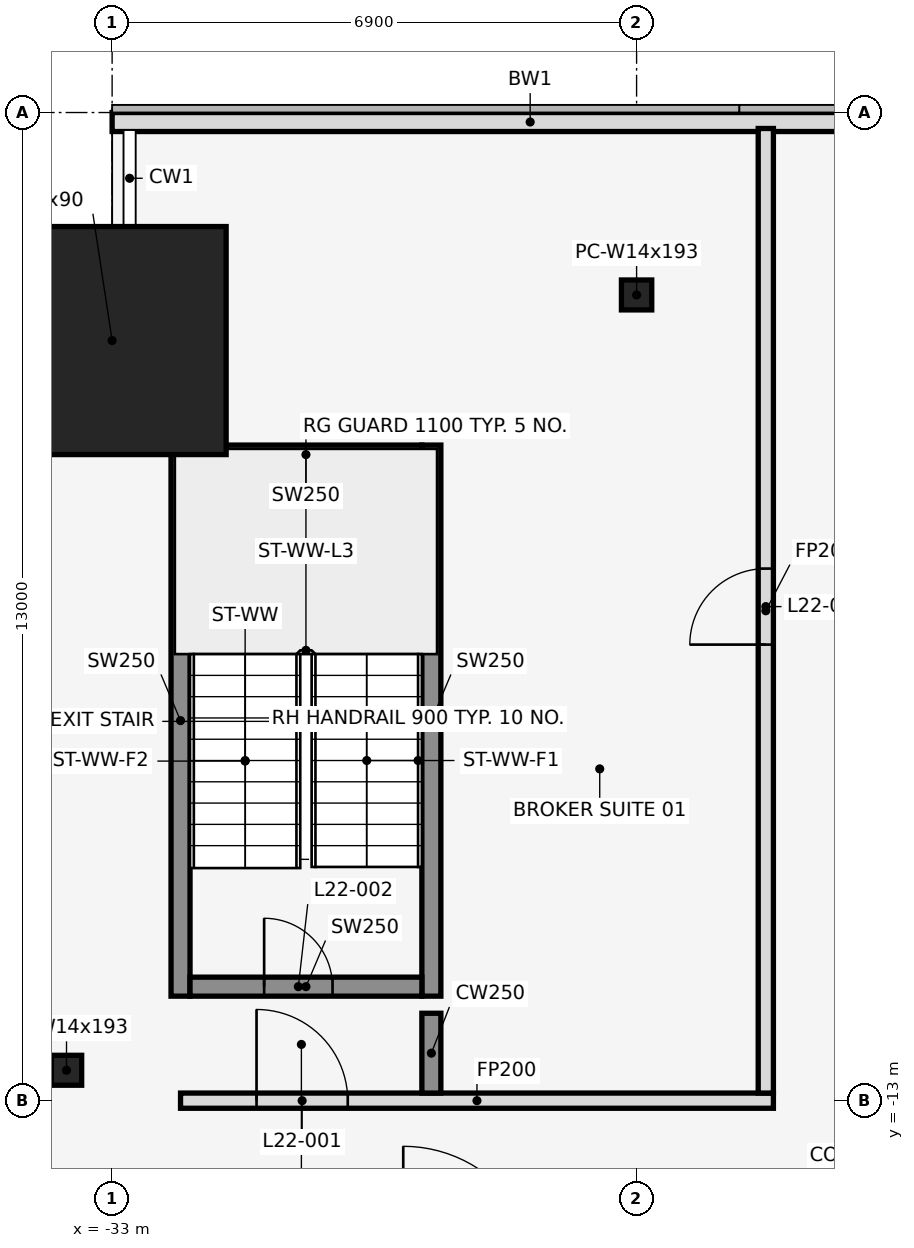
"""IFC4 building model, lengths in metres.
Left out: names, types, materials, properties, quantities, classifications, styles, units other than length and angle.
Written with IfcOpenShell. Run it as: python <this file> out.ifc"""

import sys

from ifc_helpers import new_model, si_unit, direction, frame, frame_2d, origin, origin_2d, place, context, subcontext, project, spatial, rectangle, hollow_rectangle, i_section, extrude, element, fill, save


model = new_model("IFC4")
c1 = context("Model", 3, precision=1e-05, world=origin(), true_north=direction((0.0, 1.0)))
c2 = subcontext(c1, "Body", "Model", "MODEL_VIEW")
j1 = project(units=[si_unit("LENGTHUNIT", "METRE"), si_unit("PLANEANGLEUNIT", "RADIAN")], contexts=[c1])
p1 = place(None, origin())
s1 = spatial("IfcSite", under=j1, at=p1, CompositionType="ELEMENT")
p2 = place(p1, origin())
s2 = spatial("IfcBuilding", under=s1, at=p2, CompositionType="ELEMENT")
p3 = place(p2, frame((0.0, 0.0, 106.3)))
s3 = spatial("IfcBuildingStorey", under=s2, at=p3, CompositionType="ELEMENT", Elevation=106.3)
p4 = place(p3, frame((-33.0, -3.0, 0.0), z_axis=(0.0, 0.0, 1.0), x_axis=(1.0, 0.0, 0.0)))
e1 = element("IfcColumn", 1, at=p4, inside=s3, PredefinedType="COLUMN", context=c2, shape_type="SweptSolid", body=[
    extrude(hollow_rectangle(XDim=3.0, YDim=3.0, WallThickness=0.09, at=origin_2d()), origin(), (0.0, 0.0, 1.0), 4.1),
])
for number, where, z_axis, x_axis in (
    (2, (-26.1, -2.4, 0.0), (0.0, 0.0, 1.0), (1.0, 0.0, 0.0)),
    (3, (-33.6, -12.6, 0.0), (0.0, 0.0, 1.0), (1.0, 0.0, 0.0)),
):
    element("IfcColumn", number, at=place(p3, frame(where, z_axis=z_axis, x_axis=x_axis)), inside=s3, PredefinedType="COLUMN", context=c2, shape_type="SweptSolid", body=[
        extrude(i_section(OverallWidth=0.399, OverallDepth=0.394, WebThickness=0.023, FlangeThickness=0.037, at=origin_2d()), origin(), (0.0, 0.0, 1.0), 4.1),
    ])
p5 = place(p3, frame((-22.0, -0.125, 0.0), z_axis=(0.0, 0.0, 1.0), x_axis=(-1.0, 0.0, 0.0)))
e4 = element("IfcWall", 4, at=p5, inside=s3, PredefinedType="STANDARD", context=c2, shape_type="SweptSolid", body=[
    extrude(rectangle(XDim=11.0, YDim=0.25, at=frame_2d((5.5, 0.0))), origin(), (0.0, 0.0, 1.0), 3.95),
])
for number, where, z_axis, x_axis in (
    (5, (-32.1, -11.625, 0.0), (0.0, 0.0, 1.0), (0.0, 1.0, 0.0)),
    (6, (-28.8, -11.625, 0.0), (0.0, 0.0, 1.0), (0.0, 1.0, 0.0)),
):
    element("IfcWall", number, at=place(p3, frame(where, z_axis=z_axis, x_axis=x_axis)), inside=s3, PredefinedType="SHEAR", context=c2, shape_type="SweptSolid", body=[
        extrude(rectangle(XDim=7.25, YDim=0.25, at=frame_2d((3.625, 0.0))), origin(), (0.0, 0.0, 1.0), 4.1),
    ])
p6 = place(p3, frame((-31.975, -11.5, 0.0), z_axis=(0.0, 0.0, 1.0), x_axis=(1.0, 0.0, 0.0)))
e7 = element("IfcWall", 7, at=p6, inside=s3, PredefinedType="SHEAR", context=c2, shape_type="SweptSolid", body=[
    extrude(rectangle(XDim=3.05, YDim=0.25, at=frame_2d((1.525, 0.0))), origin(), (0.0, 0.0, 1.0), 4.1),
])
p7 = place(p6, frame((0.975, 0.0, 0.0)))
e8 = element("IfcOpeningElement", 8, at=p7, cuts=e7, PredefinedType="OPENING", context=c2, shape_type="SweptSolid", body=[
    extrude(rectangle(XDim=0.9, YDim=2.1, at=frame_2d((0.45, 1.05))), frame((0.0, 0.137, 0.0), z_axis=(0.0, -1.0, 0.0), x_axis=(1.0, 0.0, 0.0)), (0.0, 0.0, 1.0), 0.274),
])
p8 = place(p3, frame((-31.975, -4.5, 0.0), z_axis=(0.0, 0.0, 1.0), x_axis=(1.0, 0.0, 0.0)))
e9 = element("IfcWall", 9, at=p8, inside=s3, PredefinedType="SHEAR", context=c2, shape_type="SweptSolid", body=[
    extrude(rectangle(XDim=3.05, YDim=0.25, at=frame_2d((1.525, 0.0))), origin(), (0.0, 0.0, 1.0), 4.1),
])
p9 = place(p3, frame((-32.1, -13.0, 0.0), z_axis=(0.0, 0.0, 1.0), x_axis=(1.0, 0.0, 0.0)))
e10 = element("IfcWall", 10, at=p9, inside=s3, PredefinedType="PARTITIONING", context=c2, shape_type="SweptSolid", body=[
    extrude(rectangle(XDim=7.8, YDim=0.2, at=frame_2d((3.9, 0.0))), origin(), (0.0, 0.0, 1.0), 3.018),
])
p10 = place(p9, frame((1.0, 0.0, 0.0)))
e11 = element("IfcOpeningElement", 11, at=p10, cuts=e10, PredefinedType="OPENING", context=c2, shape_type="SweptSolid", body=[
    extrude(rectangle(XDim=1.2, YDim=2.1, at=frame_2d((0.6, 1.05))), frame((0.0, 0.112, 0.0), z_axis=(0.0, -1.0, 0.0), x_axis=(1.0, 0.0, 0.0)), (0.0, 0.0, 1.0), 0.224),
])
p11 = place(p3, frame((-28.8, -12.9, 0.0), z_axis=(0.0, 0.0, 1.0), x_axis=(0.0, 1.0, 0.0)))
e12 = element("IfcWall", 12, at=p11, inside=s3, PredefinedType="SHEAR", context=c2, shape_type="SweptSolid", body=[
    extrude(rectangle(XDim=1.05, YDim=0.25, at=frame_2d((0.525, 0.0))), origin(), (0.0, 0.0, 1.0), 4.1),
])
p12 = place(p3, frame((-24.4, -12.9, 0.0), z_axis=(0.0, 0.0, 1.0), x_axis=(0.0, 1.0, 0.0)))
e13 = element("IfcWall", 13, at=p12, inside=s3, PredefinedType="PARTITIONING", context=c2, shape_type="SweptSolid", body=[
    extrude(rectangle(XDim=12.69, YDim=0.2, at=frame_2d((6.345, 0.0))), origin(), (0.0, 0.0, 1.0), 3.018),
])
p13 = place(p12, frame((5.9, 0.0, 0.0)))
e14 = element("IfcOpeningElement", 14, at=p13, cuts=e13, PredefinedType="OPENING", context=c2, shape_type="SweptSolid", body=[
    extrude(rectangle(XDim=1.0, YDim=2.1, at=frame_2d((0.5, 1.05))), frame((0.0, 0.112, 0.0), z_axis=(0.0, -1.0, 0.0), x_axis=(1.0, 0.0, 0.0)), (0.0, 0.0, 1.0), 0.224),
])
p14 = place(p10, origin())
e15 = element("IfcDoor", 15, at=p14, inside=s3, OperationType="SINGLE_SWING_LEFT", PredefinedType="DOOR", context=c2, shape_type="SweptSolid", body=[
    extrude(rectangle(XDim=1.2, YDim=2.1, at=frame_2d((0.6, 1.05))), frame((0.0, 0.025, 0.0), z_axis=(0.0, -1.0, 0.0), x_axis=(1.0, 0.0, 0.0)), (0.0, 0.0, 1.0), 0.05),
])
fill(e11, e15)
p15 = place(p7, origin())
e16 = element("IfcDoor", 16, at=p15, inside=s3, OperationType="SINGLE_SWING_LEFT", PredefinedType="DOOR", context=c2, shape_type="SweptSolid", body=[
    extrude(rectangle(XDim=0.9, YDim=2.1, at=frame_2d((0.45, 1.05))), frame((0.0, 0.025, 0.0), z_axis=(0.0, -1.0, 0.0), x_axis=(1.0, 0.0, 0.0)), (0.0, 0.0, 1.0), 0.05),
])
fill(e8, e16)
p16 = place(p13, origin())
e17 = element("IfcDoor", 17, at=p16, inside=s3, OperationType="SINGLE_SWING_LEFT", PredefinedType="DOOR", context=c2, shape_type="SweptSolid", body=[
    extrude(rectangle(XDim=1.0, YDim=2.1, at=frame_2d((0.5, 1.05))), frame((0.0, 0.025, 0.0), z_axis=(0.0, -1.0, 0.0), x_axis=(1.0, 0.0, 0.0)), (0.0, 0.0, 1.0), 0.05),
])
fill(e14, e17)
save(model, sys.argv[1])
